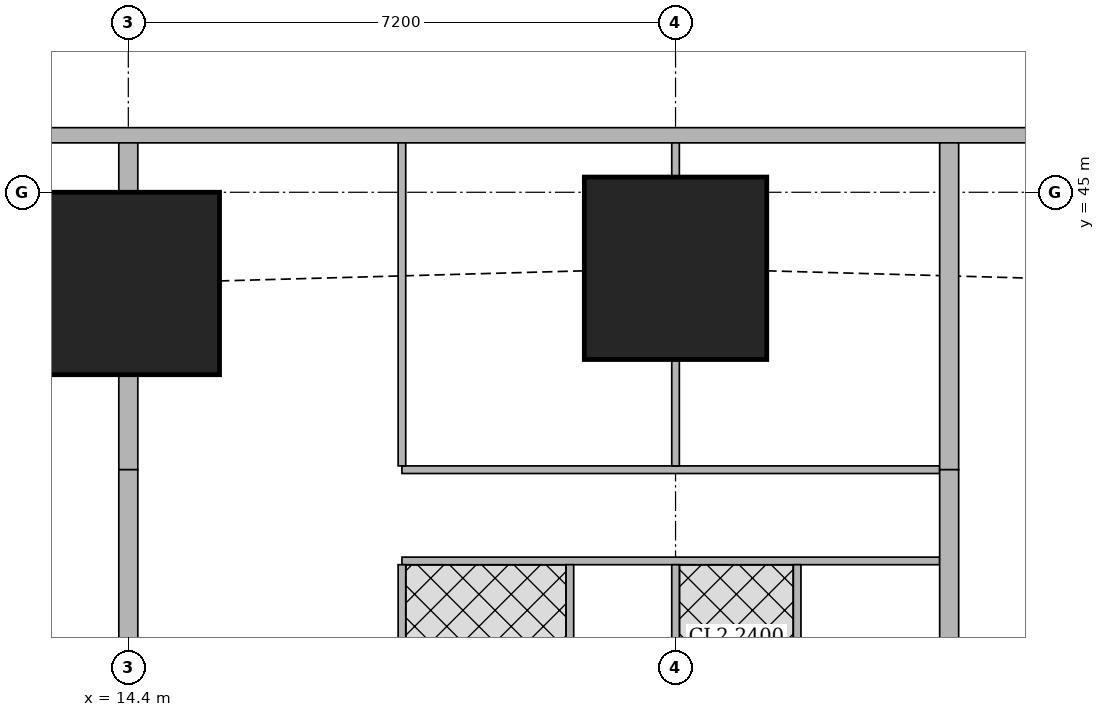
"""IFC4 building model, lengths in metres.
Left out: names, types, materials, properties, quantities, classifications, styles, units other than length and angle.
Written with IfcOpenShell. Run it as: python <this file> out.ifc"""

import sys

from ifc_helpers import new_model, si_unit, direction, frame, frame_2d, origin, origin_2d, place, context, subcontext, project, spatial, rectangle, extrude, element, fill, save


model = new_model("IFC4")
c1 = context("Model", 3, precision=1e-05, world=origin(), true_north=direction((0.0, 1.0)))
c2 = subcontext(c1, "Body", "Model", "MODEL_VIEW")
j1 = project(units=[si_unit("LENGTHUNIT", "METRE"), si_unit("PLANEANGLEUNIT", "RADIAN")], contexts=[c1])
p1 = place(None, origin())
s1 = spatial("IfcSite", under=j1, at=p1, CompositionType="ELEMENT")
p2 = place(p1, origin())
s2 = spatial("IfcBuilding", under=s1, at=p2, CompositionType="ELEMENT")
p3 = place(p2, frame((0.0, 0.0, 216.2)))
s3 = spatial("IfcBuildingStorey", under=s2, at=p3, CompositionType="ELEMENT", Elevation=216.2)
for number, where, z_axis, x_axis in (
    (1, (14.4, 43.8, 0.0), (0.0, 0.0, 1.0), (1.0, 0.0, 0.0)),
    (2, (21.6, 44.0, 0.0), (0.0, 0.0, 1.0), (1.0, 0.0, 0.0)),
):
    element("IfcColumn", number, at=place(p3, frame(where, z_axis=z_axis, x_axis=x_axis)), inside=s3, PredefinedType="COLUMN", context=c2, shape_type="SweptSolid", body=[
        extrude(rectangle(XDim=2.4, YDim=2.4, at=origin_2d()), origin(), (0.0, 0.0, 1.0), 3.75),
    ])
p4 = place(p3, frame((40.106, 45.75, 0.0), z_axis=(0.0, 0.0, 1.0), x_axis=(-1.0, 0.0, 0.0)))
e3 = element("IfcWall", 3, at=p4, inside=s3, PredefinedType="SOLIDWALL", context=c2, shape_type="SweptSolid", body=[
    extrude(rectangle(XDim=32.743, YDim=0.2, at=frame_2d((16.372, 0.0))), origin(), (0.0, 0.0, 1.0), 3.5),
])
p5 = place(p4, frame((8.606, 0.0, 0.9)))
e4 = element("IfcOpeningElement", 4, at=p5, cuts=e3, PredefinedType="OPENING", context=c2, shape_type="SweptSolid", body=[
    extrude(rectangle(XDim=1.8, YDim=1.5, at=frame_2d((0.9, 0.75))), frame((0.0, 0.11, 0.0), z_axis=(0.0, -1.0, 0.0), x_axis=(1.0, 0.0, 0.0)), (0.0, 0.0, 1.0), 0.22),
])
p6 = place(p4, frame((12.206, 0.0, 0.9)))
e5 = element("IfcOpeningElement", 5, at=p6, cuts=e3, PredefinedType="OPENING", context=c2, shape_type="SweptSolid", body=[
    extrude(rectangle(XDim=1.8, YDim=1.5, at=frame_2d((0.9, 0.75))), frame((0.0, 0.11, 0.0), z_axis=(0.0, -1.0, 0.0), x_axis=(1.0, 0.0, 0.0)), (0.0, 0.0, 1.0), 0.22),
])
p7 = place(p4, frame((15.806, 0.0, 0.9)))
e6 = element("IfcOpeningElement", 6, at=p7, cuts=e3, PredefinedType="OPENING", context=c2, shape_type="SweptSolid", body=[
    extrude(rectangle(XDim=1.8, YDim=1.5, at=frame_2d((0.9, 0.75))), frame((0.0, 0.11, 0.0), z_axis=(0.0, -1.0, 0.0), x_axis=(1.0, 0.0, 0.0)), (0.0, 0.0, 1.0), 0.22),
])
p8 = place(p4, frame((19.406, 0.0, 0.9)))
e7 = element("IfcOpeningElement", 7, at=p8, cuts=e3, PredefinedType="OPENING", context=c2, shape_type="SweptSolid", body=[
    extrude(rectangle(XDim=1.8, YDim=1.5, at=frame_2d((0.9, 0.75))), frame((0.0, 0.11, 0.0), z_axis=(0.0, -1.0, 0.0), x_axis=(1.0, 0.0, 0.0)), (0.0, 0.0, 1.0), 0.22),
])
p9 = place(p4, frame((23.006, 0.0, 0.9)))
e8 = element("IfcOpeningElement", 8, at=p9, cuts=e3, PredefinedType="OPENING", context=c2, shape_type="SweptSolid", body=[
    extrude(rectangle(XDim=1.8, YDim=1.5, at=frame_2d((0.9, 0.75))), frame((0.0, 0.11, 0.0), z_axis=(0.0, -1.0, 0.0), x_axis=(1.0, 0.0, 0.0)), (0.0, 0.0, 1.0), 0.22),
])
p10 = place(p4, frame((28.025, 0.0, 0.9)))
e9 = element("IfcOpeningElement", 9, at=p10, cuts=e3, PredefinedType="OPENING", context=c2, shape_type="SweptSolid", body=[
    extrude(rectangle(XDim=2.4, YDim=1.5, at=frame_2d((1.2, 0.75))), frame((0.0, 0.11, 0.0), z_axis=(0.0, -1.0, 0.0), x_axis=(1.0, 0.0, 0.0)), (0.0, 0.0, 1.0), 0.22),
])
p11 = place(p3, frame((18.0, 41.35, 0.0), z_axis=(0.0, 0.0, 1.0), x_axis=(1.0, 0.0, 0.0)))
e10 = element("IfcWall", 10, at=p11, inside=s3, PredefinedType="PARTITIONING", context=c2, shape_type="SweptSolid", body=[
    extrude(rectangle(XDim=7.075, YDim=0.1, at=frame_2d((3.538, 0.0))), origin(), (0.0, 0.0, 1.0), 3.5),
])
p12 = place(p11, frame((0.2, 0.0, 0.0)))
e11 = element("IfcOpeningElement", 11, at=p12, cuts=e10, PredefinedType="OPENING", context=c2, shape_type="SweptSolid", body=[
    extrude(rectangle(XDim=0.9, YDim=2.1, at=frame_2d((0.45, 1.05))), frame((0.0, 0.06, 0.0), z_axis=(0.0, -1.0, 0.0), x_axis=(1.0, 0.0, 0.0)), (0.0, 0.0, 1.0), 0.12),
])
p13 = place(p11, frame((3.8, 0.0, 0.0)))
e12 = element("IfcOpeningElement", 12, at=p13, cuts=e10, PredefinedType="OPENING", context=c2, shape_type="SweptSolid", body=[
    extrude(rectangle(XDim=0.9, YDim=2.1, at=frame_2d((0.45, 1.05))), frame((0.0, 0.06, 0.0), z_axis=(0.0, -1.0, 0.0), x_axis=(1.0, 0.0, 0.0)), (0.0, 0.0, 1.0), 0.12),
])
p14 = place(p3, frame((18.0, 40.15, 0.0), z_axis=(0.0, 0.0, 1.0), x_axis=(1.0, 0.0, 0.0)))
e13 = element("IfcWall", 13, at=p14, inside=s3, PredefinedType="PARTITIONING", context=c2, shape_type="SweptSolid", body=[
    extrude(rectangle(XDim=7.075, YDim=0.1, at=frame_2d((3.538, 0.0))), origin(), (0.0, 0.0, 1.0), 3.5),
])
p15 = place(p14, frame((0.655, 0.0, 0.0)))
e14 = element("IfcOpeningElement", 14, at=p15, cuts=e13, PredefinedType="OPENING", context=c2, shape_type="SweptSolid", body=[
    extrude(rectangle(XDim=0.9, YDim=2.1, at=frame_2d((0.45, 1.05))), frame((0.0, 0.06, 0.0), z_axis=(0.0, -1.0, 0.0), x_axis=(1.0, 0.0, 0.0)), (0.0, 0.0, 1.0), 0.12),
])
p16 = place(p14, frame((3.95, 0.0, 0.0)))
e15 = element("IfcOpeningElement", 15, at=p16, cuts=e13, PredefinedType="OPENING", context=c2, shape_type="SweptSolid", body=[
    extrude(rectangle(XDim=0.9, YDim=2.1, at=frame_2d((0.45, 1.05))), frame((0.0, 0.06, 0.0), z_axis=(0.0, -1.0, 0.0), x_axis=(1.0, 0.0, 0.0)), (0.0, 0.0, 1.0), 0.12),
])
p17 = place(p14, frame((2.455, 0.0, 0.0)))
e16 = element("IfcOpeningElement", 16, at=p17, cuts=e13, PredefinedType="OPENING", context=c2, shape_type="SweptSolid", body=[
    extrude(rectangle(XDim=0.9, YDim=2.1, at=frame_2d((0.45, 1.05))), frame((0.0, 0.06, 0.0), z_axis=(0.0, -1.0, 0.0), x_axis=(1.0, 0.0, 0.0)), (0.0, 0.0, 1.0), 0.12),
])
p18 = place(p14, frame((5.75, 0.0, 0.0)))
e17 = element("IfcOpeningElement", 17, at=p18, cuts=e13, PredefinedType="OPENING", context=c2, shape_type="SweptSolid", body=[
    extrude(rectangle(XDim=0.9, YDim=2.1, at=frame_2d((0.45, 1.05))), frame((0.0, 0.06, 0.0), z_axis=(0.0, -1.0, 0.0), x_axis=(1.0, 0.0, 0.0)), (0.0, 0.0, 1.0), 0.12),
])
p19 = place(p3, frame((18.0, 41.4, 0.0), z_axis=(0.0, 0.0, 1.0), x_axis=(0.0, 1.0, 0.0)))
e18 = element("IfcWall", 18, at=p19, inside=s3, PredefinedType="PARTITIONING", context=c2, shape_type="SweptSolid", body=[
    extrude(rectangle(XDim=4.25, YDim=0.1, at=frame_2d((2.125, 0.0))), origin(), (0.0, 0.0, 1.0), 2.05),
])
p20 = place(p3, frame((21.6, 41.4, 0.0), z_axis=(0.0, 0.0, 1.0), x_axis=(0.0, 1.0, 0.0)))
e19 = element("IfcWall", 19, at=p20, inside=s3, PredefinedType="PARTITIONING", context=c2, shape_type="SweptSolid", body=[
    extrude(rectangle(XDim=1.399, YDim=0.1, at=frame_2d((0.7, 0.0))), origin(), (0.0, 0.0, 1.0), 3.5),
])
p21 = place(p3, frame((21.6, 45.201, 0.0), z_axis=(0.0, 0.0, 1.0), x_axis=(0.0, 1.0, 0.0)))
e20 = element("IfcWall", 20, at=p21, inside=s3, PredefinedType="PARTITIONING", context=c2, shape_type="SweptSolid", body=[
    extrude(rectangle(XDim=0.449, YDim=0.1, at=frame_2d((0.225, 0.0))), origin(), (0.0, 0.0, 1.0), 3.5),
])
p22 = place(p3, frame((18.0, 36.825, 0.0), z_axis=(0.0, 0.0, 1.0), x_axis=(0.0, 1.0, 0.0)))
e21 = element("IfcWall", 21, at=p22, inside=s3, PredefinedType="PARTITIONING", context=c2, shape_type="SweptSolid", body=[
    extrude(rectangle(XDim=3.275, YDim=0.1, at=frame_2d((1.638, 0.0))), origin(), (0.0, 0.0, 1.0), 3.5),
])
p23 = place(p3, frame((21.6, 38.201, 0.0), z_axis=(0.0, 0.0, 1.0), x_axis=(0.0, 1.0, 0.0)))
e22 = element("IfcWall", 22, at=p23, inside=s3, PredefinedType="PARTITIONING", context=c2, shape_type="SweptSolid", body=[
    extrude(rectangle(XDim=1.899, YDim=0.1, at=frame_2d((0.95, 0.0))), origin(), (0.0, 0.0, 1.0), 3.5),
])
for number, where, z_axis, x_axis in (
    (23, (20.21, 36.825, 0.0), (0.0, 0.0, 1.0), (0.0, 1.0, 0.0)),
    (24, (23.2, 36.825, 0.0), (0.0, 0.0, 1.0), (0.0, 1.0, 0.0)),
):
    element("IfcWall", number, at=place(p3, frame(where, z_axis=z_axis, x_axis=x_axis)), inside=s3, PredefinedType="PARTITIONING", context=c2, shape_type="SweptSolid", body=[
        extrude(rectangle(XDim=3.275, YDim=0.1, at=frame_2d((1.638, 0.0))), origin(), (0.0, 0.0, 1.0), 3.5),
    ])
p24 = place(p3, frame((14.4, 41.35, 0.0), z_axis=(0.0, 0.0, 1.0), x_axis=(0.0, 1.0, 0.0)))
e25 = element("IfcWall", 25, at=p24, inside=s3, PredefinedType="SOLIDWALL", context=c2, shape_type="SweptSolid", body=[
    extrude(rectangle(XDim=1.249, YDim=0.25, at=frame_2d((0.625, 0.0))), origin(), (0.0, 0.0, 1.0), 2.05),
])
p25 = place(p3, frame((14.4, 45.001, 0.0), z_axis=(0.0, 0.0, 1.0), x_axis=(0.0, 1.0, 0.0)))
e26 = element("IfcWall", 26, at=p25, inside=s3, PredefinedType="SOLIDWALL", context=c2, shape_type="SweptSolid", body=[
    extrude(rectangle(XDim=0.649, YDim=0.25, at=frame_2d((0.324, 0.0))), origin(), (0.0, 0.0, 1.0), 2.05),
])
p26 = place(p3, frame((14.4, 38.201, 0.0), z_axis=(0.0, 0.0, 1.0), x_axis=(0.0, 1.0, 0.0)))
e27 = element("IfcWall", 27, at=p26, inside=s3, PredefinedType="SOLIDWALL", context=c2, shape_type="SweptSolid", body=[
    extrude(rectangle(XDim=3.149, YDim=0.25, at=frame_2d((1.575, 0.0))), origin(), (0.0, 0.0, 1.0), 3.5),
])
p27 = place(p3, frame((25.2, 41.35, 0.0), z_axis=(0.0, 0.0, 1.0), x_axis=(0.0, 1.0, 0.0)))
e28 = element("IfcWall", 28, at=p27, inside=s3, PredefinedType="SOLIDWALL", context=c2, shape_type="SweptSolid", body=[
    extrude(rectangle(XDim=4.3, YDim=0.25, at=frame_2d((2.15, 0.0))), origin(), (0.0, 0.0, 1.0), 2.05),
])
p28 = place(p3, frame((25.2, 36.825, 0.0), z_axis=(0.0, 0.0, 1.0), x_axis=(0.0, 1.0, 0.0)))
e29 = element("IfcWall", 29, at=p28, inside=s3, PredefinedType="SOLIDWALL", context=c2, shape_type="SweptSolid", body=[
    extrude(rectangle(XDim=4.525, YDim=0.25, at=frame_2d((2.263, 0.0))), origin(), (0.0, 0.0, 1.0), 3.5),
])
p29 = place(p6, origin())
e30 = element("IfcWindow", 30, at=p29, inside=s3, PartitioningType="SINGLE_PANEL", PredefinedType="WINDOW", context=c2, shape_type="SweptSolid", body=[
    extrude(rectangle(XDim=1.8, YDim=1.5, at=frame_2d((0.9, 0.75))), frame((0.0, 0.03, 0.0), z_axis=(0.0, -1.0, 0.0), x_axis=(1.0, 0.0, 0.0)), (0.0, 0.0, 1.0), 0.06),
])
fill(e5, e30)
p30 = place(p7, origin())
e31 = element("IfcWindow", 31, at=p30, inside=s3, PartitioningType="SINGLE_PANEL", PredefinedType="WINDOW", context=c2, shape_type="SweptSolid", body=[
    extrude(rectangle(XDim=1.8, YDim=1.5, at=frame_2d((0.9, 0.75))), frame((0.0, 0.03, 0.0), z_axis=(0.0, -1.0, 0.0), x_axis=(1.0, 0.0, 0.0)), (0.0, 0.0, 1.0), 0.06),
])
fill(e6, e31)
p31 = place(p8, origin())
e32 = element("IfcWindow", 32, at=p31, inside=s3, PartitioningType="SINGLE_PANEL", PredefinedType="WINDOW", context=c2, shape_type="SweptSolid", body=[
    extrude(rectangle(XDim=1.8, YDim=1.5, at=frame_2d((0.9, 0.75))), frame((0.0, 0.03, 0.0), z_axis=(0.0, -1.0, 0.0), x_axis=(1.0, 0.0, 0.0)), (0.0, 0.0, 1.0), 0.06),
])
fill(e7, e32)
p32 = place(p9, origin())
e33 = element("IfcWindow", 33, at=p32, inside=s3, PartitioningType="SINGLE_PANEL", PredefinedType="WINDOW", context=c2, shape_type="SweptSolid", body=[
    extrude(rectangle(XDim=1.8, YDim=1.5, at=frame_2d((0.9, 0.75))), frame((0.0, 0.03, 0.0), z_axis=(0.0, -1.0, 0.0), x_axis=(1.0, 0.0, 0.0)), (0.0, 0.0, 1.0), 0.06),
])
fill(e8, e33)
p33 = place(p12, origin())
e34 = element("IfcDoor", 34, at=p33, inside=s3, OperationType="SINGLE_SWING_LEFT", PredefinedType="DOOR", context=c2, shape_type="SweptSolid", body=[
    extrude(rectangle(XDim=0.9, YDim=2.1, at=frame_2d((0.45, 1.05))), frame((0.0, 0.025, 0.0), z_axis=(0.0, -1.0, 0.0), x_axis=(1.0, 0.0, 0.0)), (0.0, 0.0, 1.0), 0.05),
])
fill(e11, e34)
p34 = place(p13, origin())
e35 = element("IfcDoor", 35, at=p34, inside=s3, OperationType="SINGLE_SWING_LEFT", PredefinedType="DOOR", context=c2, shape_type="SweptSolid", body=[
    extrude(rectangle(XDim=0.9, YDim=2.1, at=frame_2d((0.45, 1.05))), frame((0.0, 0.025, 0.0), z_axis=(0.0, -1.0, 0.0), x_axis=(1.0, 0.0, 0.0)), (0.0, 0.0, 1.0), 0.05),
])
fill(e12, e35)
p35 = place(p15, origin())
e36 = element("IfcDoor", 36, at=p35, inside=s3, OperationType="SINGLE_SWING_RIGHT", PredefinedType="DOOR", context=c2, shape_type="SweptSolid", body=[
    extrude(rectangle(XDim=0.9, YDim=2.1, at=frame_2d((0.45, 1.05))), frame((0.0, 0.025, 0.0), z_axis=(0.0, -1.0, 0.0), x_axis=(1.0, 0.0, 0.0)), (0.0, 0.0, 1.0), 0.05),
])
fill(e14, e36)
p36 = place(p16, origin())
e37 = element("IfcDoor", 37, at=p36, inside=s3, OperationType="SINGLE_SWING_LEFT", PredefinedType="DOOR", context=c2, shape_type="SweptSolid", body=[
    extrude(rectangle(XDim=0.9, YDim=2.1, at=frame_2d((0.45, 1.05))), frame((0.0, 0.025, 0.0), z_axis=(0.0, -1.0, 0.0), x_axis=(1.0, 0.0, 0.0)), (0.0, 0.0, 1.0), 0.05),
])
fill(e15, e37)
p37 = place(p17, origin())
e38 = element("IfcDoor", 38, at=p37, inside=s3, OperationType="SINGLE_SWING_LEFT", PredefinedType="DOOR", context=c2, shape_type="SweptSolid", body=[
    extrude(rectangle(XDim=0.9, YDim=2.1, at=frame_2d((0.45, 1.05))), frame((0.0, 0.025, 0.0), z_axis=(0.0, -1.0, 0.0), x_axis=(1.0, 0.0, 0.0)), (0.0, 0.0, 1.0), 0.05),
])
fill(e16, e38)
p38 = place(p18, origin())
e39 = element("IfcDoor", 39, at=p38, inside=s3, OperationType="SINGLE_SWING_LEFT", PredefinedType="DOOR", context=c2, shape_type="SweptSolid", body=[
    extrude(rectangle(XDim=0.9, YDim=2.1, at=frame_2d((0.45, 1.05))), frame((0.0, 0.025, 0.0), z_axis=(0.0, -1.0, 0.0), x_axis=(1.0, 0.0, 0.0)), (0.0, 0.0, 1.0), 0.05),
])
fill(e17, e39)
save(model, sys.argv[1])
